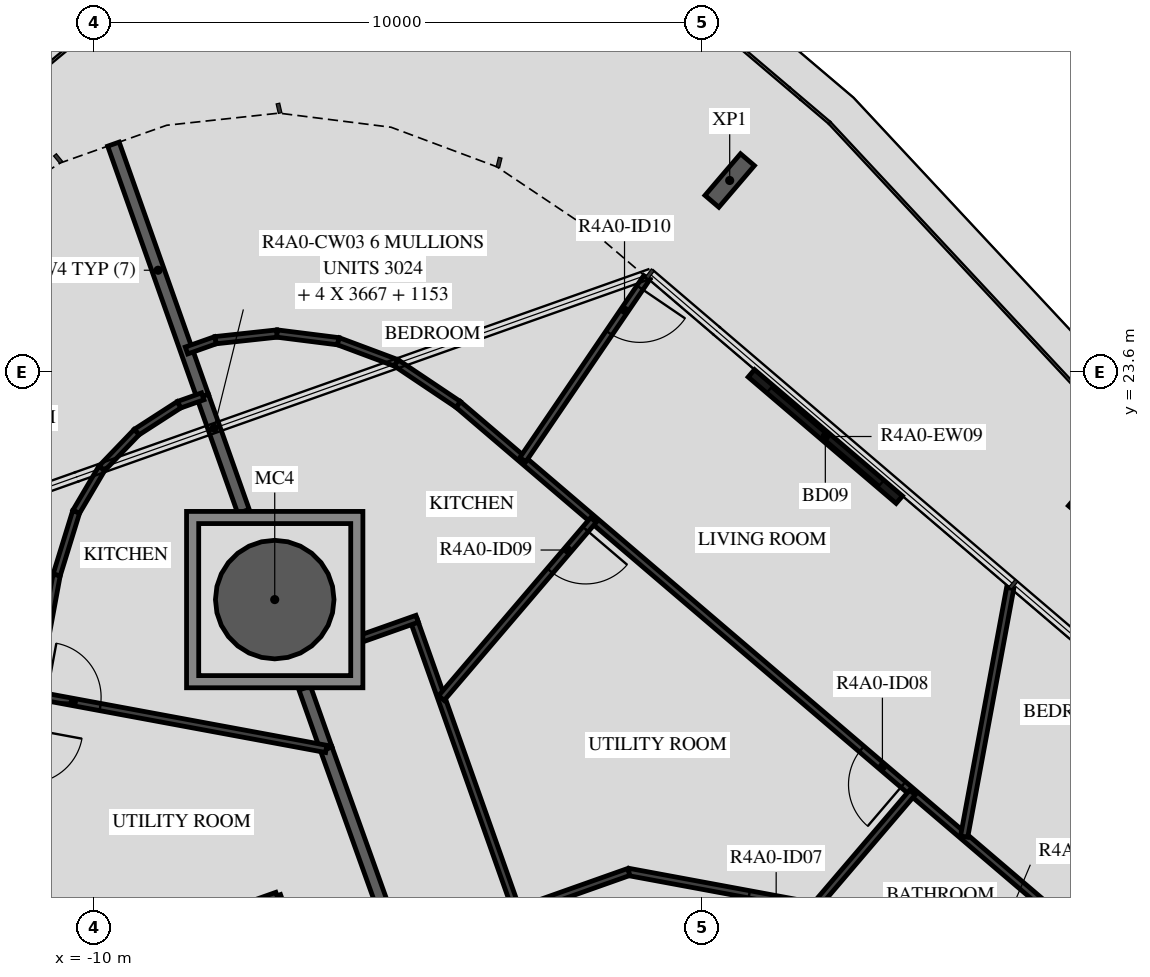
"""IFC4 building model, lengths in metres.
Left out: names, types, materials, properties, quantities, classifications, styles, units other than length and angle.
Written with IfcOpenShell. Run it as: python <this file> out.ifc"""

import sys

from ifc_helpers import new_model, si_unit, direction, frame, frame_2d, origin, origin_2d, place, context, subcontext, project, spatial, polyline, rectangle, hollow_circle, i_section, outline, extrude, element, fill, save


model = new_model("IFC4")
c1 = context("Model", 3, precision=1e-05, world=origin(), true_north=direction((0.0, 1.0)))
c2 = subcontext(c1, "Body", "Model", "MODEL_VIEW")
j1 = project(units=[si_unit("LENGTHUNIT", "METRE"), si_unit("PLANEANGLEUNIT", "RADIAN")], contexts=[c1])
p1 = place(None, origin())
s1 = spatial("IfcSite", under=j1, at=p1, CompositionType="ELEMENT")
p2 = place(p1, origin())
s2 = spatial("IfcBuilding", under=s1, at=p2, CompositionType="ELEMENT")
p3 = place(p2, frame((0.0, 0.0, 151.7)))
s3 = spatial("IfcBuildingStorey", under=s2, at=p3, CompositionType="ELEMENT", Elevation=151.7)
p4 = place(p3, frame((-7.032, 19.858, -0.45), z_axis=(0.0, 0.0, 1.0), x_axis=(1.0, 0.0, 0.0)))
e1 = element("IfcColumn", 1, at=p4, inside=s3, PredefinedType="COLUMN", context=c2, shape_type="SweptSolid", body=[
    extrude(hollow_circle(Radius=0.975, WallThickness=0.045, at=origin_2d()), origin(), (0.0, 0.0, 1.0), 3.57),
])
for number, where, z_axis, x_axis in (
    (2, (6.427, 21.645, -0.45), (0.0, 0.0, 1.0), (0.76, -0.649, 0.0)),
    (3, (0.45, 26.75, -0.45), (0.0, 0.0, 1.0), (0.76, -0.649, 0.0)),
):
    element("IfcColumn", number, at=place(p3, frame(where, z_axis=z_axis, x_axis=x_axis)), inside=s3, PredefinedType="COLUMN", context=c2, shape_type="SweptSolid", body=[
        extrude(i_section(OverallWidth=0.3, OverallDepth=0.9, WebThickness=0.019, FlangeThickness=0.035, FilletRadius=0.03, at=origin_2d()), origin(), (0.0, 0.0, 1.0), 3.57),
    ])
p5 = place(p3, frame((3.24, 21.5, 0.0), z_axis=(0.0, 0.0, 1.0), x_axis=(-0.760429407868, 0.649420599957, 0.0)))
e4 = element("IfcWall", 4, at=p5, inside=s3, PredefinedType="STANDARD", context=c2, shape_type="SweptSolid", body=[
    extrude(rectangle(XDim=3.2, YDim=0.16, at=frame_2d((1.6, 0.0))), origin(), (0.0, 0.0, 1.0), 3.12),
])
p6 = place(p5, frame((0.4, 0.0, 0.0)))
e5 = element("IfcOpeningElement", 5, at=p6, cuts=e4, PredefinedType="OPENING", context=c2, shape_type="SweptSolid", body=[
    extrude(rectangle(XDim=2.4, YDim=2.4, at=frame_2d((1.2, 1.2))), frame((0.0, 0.09, 0.0), z_axis=(0.0, -1.0, 0.0), x_axis=(1.0, 0.0, 0.0)), (0.0, 0.0, 1.0), 0.18),
])
p7 = place(p3, frame((-6.185, 17.402, 0.0), z_axis=(0.0, 0.0, 1.0), x_axis=(0.337736730281, -0.941240618024, 0.0)))
e6 = element("IfcWall", 6, at=p7, inside=s3, PredefinedType="STANDARD", context=c2, shape_type="SweptSolid", body=[
    extrude(rectangle(XDim=5.068, YDim=0.2, at=frame_2d((2.534, 0.0))), origin(), (0.0, 0.0, 1.0), 3.12),
])
p8 = place(p3, frame((-6.539, 18.403, 0.0), z_axis=(0.0, 0.0, 1.0), x_axis=(0.333625806098, -0.942705585804, 0.0)))
e7 = element("IfcWall", 7, at=p8, inside=s3, PredefinedType="STANDARD", context=c2, shape_type="SweptSolid", body=[
    extrude(rectangle(XDim=1.062, YDim=0.2, at=frame_2d((0.531, 0.0))), origin(), (0.0, 0.0, 1.0), 3.12),
])
p9 = place(p3, frame((-9.684, 27.348, 0.0), z_axis=(0.0, 0.0, 1.0), x_axis=(0.333818381408, -0.942637410797, 0.0)))
e8 = element("IfcWall", 8, at=p9, inside=s3, PredefinedType="STANDARD", context=c2, shape_type="SweptSolid", body=[
    extrude(rectangle(XDim=4.4, YDim=0.2, at=frame_2d((2.2, 0.0))), origin(), (0.0, 0.0, 1.0), 3.12),
])
p10 = place(p3, frame((-8.216, 23.2, 0.0), z_axis=(0.0, 0.0, 1.0), x_axis=(0.333793117913, -0.942646357036, 0.0)))
e9 = element("IfcWall", 9, at=p10, inside=s3, PredefinedType="STANDARD", context=c2, shape_type="SweptSolid", body=[
    extrude(rectangle(XDim=2.008, YDim=0.2, at=frame_2d((1.004, 0.0))), origin(), (0.0, 0.0, 1.0), 3.12),
])
p11 = place(p3, frame((8.702, 12.206, 0.0), z_axis=(0.0, 0.0, 1.0), x_axis=(-0.760401313718, 0.649453494945, 0.0)))
e10 = element("IfcWall", 10, at=p11, inside=s3, PredefinedType="PARTITIONING", context=c2, shape_type="SweptSolid", body=[
    extrude(rectangle(XDim=16.724, YDim=0.12, at=frame_2d((8.362, 0.0))), origin(), (0.0, 0.0, 1.0), 3.12),
])
p12 = place(p11, frame((0.2, 0.0, 0.0)))
e11 = element("IfcOpeningElement", 11, at=p12, cuts=e10, PredefinedType="OPENING", context=c2, shape_type="SweptSolid", body=[
    extrude(rectangle(XDim=0.9, YDim=2.1, at=frame_2d((0.45, 1.05))), frame((0.0, 0.07, 0.0), z_axis=(0.0, -1.0, 0.0), x_axis=(1.0, 0.0, 0.0)), (0.0, 0.0, 1.0), 0.14),
])
p13 = place(p11, frame((7.099, 0.0, 0.0)))
e12 = element("IfcOpeningElement", 12, at=p13, cuts=e10, PredefinedType="OPENING", context=c2, shape_type="SweptSolid", body=[
    extrude(rectangle(XDim=0.9, YDim=2.1, at=frame_2d((0.45, 1.05))), frame((0.0, 0.07, 0.0), z_axis=(0.0, -1.0, 0.0), x_axis=(1.0, 0.0, 0.0)), (0.0, 0.0, 1.0), 0.14),
])
p14 = place(p3, frame((6.641, 13.923, 0.0), z_axis=(0.0, 0.0, 1.0), x_axis=(-0.983250157272, 0.182261153912, 0.0)))
e13 = element("IfcWall", 13, at=p14, inside=s3, PredefinedType="PARTITIONING", context=c2, shape_type="SweptSolid", body=[
    extrude(rectangle(XDim=7.985, YDim=0.12, at=frame_2d((3.992, 0.0))), origin(), (0.0, 0.0, 1.0), 3.12),
])
p15 = place(p14, frame((1.4, 0.0, 0.0)))
e14 = element("IfcOpeningElement", 14, at=p15, cuts=e13, PredefinedType="OPENING", context=c2, shape_type="SweptSolid", body=[
    extrude(rectangle(XDim=0.8, YDim=2.1, at=frame_2d((0.4, 1.05))), frame((0.0, 0.07, 0.0), z_axis=(0.0, -1.0, 0.0), x_axis=(1.0, 0.0, 0.0)), (0.0, 0.0, 1.0), 0.14),
])
p16 = place(p14, frame((5.069, 0.0, 0.0)))
e15 = element("IfcOpeningElement", 15, at=p16, cuts=e13, PredefinedType="OPENING", context=c2, shape_type="SweptSolid", body=[
    extrude(rectangle(XDim=0.9, YDim=2.1, at=frame_2d((0.45, 1.05))), frame((0.0, 0.07, 0.0), z_axis=(0.0, -1.0, 0.0), x_axis=(1.0, 0.0, 0.0)), (0.0, 0.0, 1.0), 0.14),
])
p17 = place(p3, frame((-1.21, 15.378, 0.0), z_axis=(0.0, 0.0, 1.0), x_axis=(-0.942633792474, -0.333828598663, 0.0)))
e16 = element("IfcWall", 16, at=p17, inside=s3, PredefinedType="PARTITIONING", context=c2, shape_type="SweptSolid", body=[
    extrude(rectangle(XDim=1.95, YDim=0.12, at=frame_2d((0.975, 0.0))), origin(), (0.0, 0.0, 1.0), 3.12),
])
p18 = place(p3, frame((-3.048, 14.727, 0.0), z_axis=(0.0, 0.0, 1.0), x_axis=(-0.333811603187, 0.942639811157, 0.0)))
e17 = element("IfcWall", 17, at=p18, inside=s3, PredefinedType="PARTITIONING", context=c2, shape_type="SweptSolid", body=[
    extrude(rectangle(XDim=5.087, YDim=0.12, at=frame_2d((2.543, 0.0))), origin(), (0.0, 0.0, 1.0), 3.12),
])
p19 = place(p3, frame((-4.689, 19.542, 0.0), z_axis=(0.0, 0.0, 1.0), x_axis=(-0.942661851862, -0.33374935662, 0.0)))
e18 = element("IfcWall", 18, at=p19, inside=s3, PredefinedType="PARTITIONING", context=c2, shape_type="SweptSolid", body=[
    extrude(rectangle(XDim=1.017, YDim=0.12, at=frame_2d((0.508, 0.0))), origin(), (0.0, 0.0, 1.0), 3.12),
])
p20 = place(p3, frame((5.063, 20.048, 0.0), z_axis=(0.0, 0.0, 1.0), x_axis=(-0.182238575099, -0.983254342348, 0.0)))
e19 = element("IfcWall", 19, at=p20, inside=s3, PredefinedType="PARTITIONING", context=c2, shape_type="SweptSolid", body=[
    extrude(rectangle(XDim=4.157, YDim=0.12, at=frame_2d((2.079, 0.0))), origin(), (0.0, 0.0, 1.0), 3.12),
])
p21 = place(p3, frame((3.456, 16.686, 0.0), z_axis=(0.0, 0.0, 1.0), x_axis=(-0.649462010463, -0.760394040591, 0.0)))
e20 = element("IfcWall", 20, at=p21, inside=s3, PredefinedType="PARTITIONING", context=c2, shape_type="SweptSolid", body=[
    extrude(rectangle(XDim=2.467, YDim=0.12, at=frame_2d((1.233, 0.0))), origin(), (0.0, 0.0, 1.0), 3.12),
])
p22 = place(p3, frame((-0.914, 25.153, 0.0), z_axis=(0.0, 0.0, 1.0), x_axis=(-0.56264004133, -0.826701992191, 0.0)))
e21 = element("IfcWall", 21, at=p22, inside=s3, PredefinedType="PARTITIONING", context=c2, shape_type="SweptSolid", body=[
    extrude(rectangle(XDim=3.622, YDim=0.12, at=frame_2d((1.811, 0.0))), origin(), (0.0, 0.0, 1.0), 2.73),
])
p23 = place(p22, frame((0.2, 0.0, 0.0)))
e22 = element("IfcOpeningElement", 22, at=p23, cuts=e21, PredefinedType="OPENING", context=c2, shape_type="SweptSolid", body=[
    extrude(rectangle(XDim=0.9, YDim=2.1, at=frame_2d((0.45, 1.05))), frame((0.0, 0.07, 0.0), z_axis=(0.0, -1.0, 0.0), x_axis=(1.0, 0.0, 0.0)), (0.0, 0.0, 1.0), 0.14),
])
p24 = place(p3, frame((-1.79, 21.167, 0.0), z_axis=(0.0, 0.0, 1.0), x_axis=(-0.649427819186, -0.760423242456, 0.0)))
e23 = element("IfcWall", 23, at=p24, inside=s3, PredefinedType="PARTITIONING", context=c2, shape_type="SweptSolid", body=[
    extrude(rectangle(XDim=3.851, YDim=0.12, at=frame_2d((1.926, 0.0))), origin(), (0.0, 0.0, 1.0), 3.12),
])
p25 = place(p24, frame((0.2, 0.0, 0.0)))
e24 = element("IfcOpeningElement", 24, at=p25, cuts=e23, PredefinedType="OPENING", context=c2, shape_type="SweptSolid", body=[
    extrude(rectangle(XDim=0.9, YDim=2.1, at=frame_2d((0.45, 1.05))), frame((0.0, 0.07, 0.0), z_axis=(0.0, -1.0, 0.0), x_axis=(1.0, 0.0, 0.0)), (0.0, 0.0, 1.0), 0.14),
])
p26 = place(p3, frame((-8.483, 23.954, 0.0), z_axis=(0.0, 0.0, 1.0), x_axis=(0.942554725445, 0.334051776738, 0.0)))
e25 = element("IfcWall", 25, at=p26, inside=s3, PredefinedType="PARTITIONING", context=c2, shape_type="SweptSolid", body=[
    extrude(rectangle(XDim=0.508, YDim=0.12, at=frame_2d((0.254, 0.0))), origin(), (0.0, 0.0, 1.0), 3.12),
])
p27 = place(p3, frame((-8.004, 24.124, 0.0), z_axis=(0.0, 0.0, 1.0), x_axis=(0.994216064839, 0.107398400431, 0.0)))
e26 = element("IfcWall", 26, at=p27, inside=s3, PredefinedType="PARTITIONING", context=c2, shape_type="SweptSolid", body=[
    extrude(rectangle(XDim=1.016, YDim=0.12, at=frame_2d((0.508, 0.0))), origin(), (0.0, 0.0, 1.0), 3.12),
])
p28 = place(p3, frame((-6.994, 24.233, 0.0), z_axis=(0.0, 0.0, 1.0), x_axis=(0.992188875952, -0.124744676991, 0.0)))
e27 = element("IfcWall", 27, at=p28, inside=s3, PredefinedType="PARTITIONING", context=c2, shape_type="SweptSolid", body=[
    extrude(rectangle(XDim=1.016, YDim=0.12, at=frame_2d((0.508, 0.0))), origin(), (0.0, 0.0, 1.0), 3.12),
])
p29 = place(p3, frame((-5.986, 24.106, 0.0), z_axis=(0.0, 0.0, 1.0), x_axis=(0.936625084254, -0.350333343469, 0.0)))
e28 = element("IfcWall", 28, at=p29, inside=s3, PredefinedType="PARTITIONING", context=c2, shape_type="SweptSolid", body=[
    extrude(rectangle(XDim=1.016, YDim=0.12, at=frame_2d((0.508, 0.0))), origin(), (0.0, 0.0, 1.0), 3.12),
])
p30 = place(p3, frame((-5.034, 23.75, 0.0), z_axis=(0.0, 0.0, 1.0), x_axis=(0.83070096574, -0.556718874764, 0.0)))
e29 = element("IfcWall", 29, at=p30, inside=s3, PredefinedType="PARTITIONING", context=c2, shape_type="SweptSolid", body=[
    extrude(rectangle(XDim=1.227, YDim=0.12, at=frame_2d((0.614, 0.0))), origin(), (0.0, 0.0, 1.0), 3.12),
])
p31 = place(p3, frame((-6.472, 13.515, 0.0), z_axis=(0.0, 0.0, 1.0), x_axis=(-0.333809516424, 0.942640550127, 0.0)))
e30 = element("IfcWall", 30, at=p31, inside=s3, PredefinedType="PARTITIONING", context=c2, shape_type="SweptSolid", body=[
    extrude(rectangle(XDim=1.562, YDim=0.12, at=frame_2d((0.781, 0.0))), origin(), (0.0, 0.0, 1.0), 3.12),
])
p32 = place(p3, frame((-6.993, 14.987, 0.0), z_axis=(0.0, 0.0, 1.0), x_axis=(-0.942599915297, -0.33392424243, 0.0)))
e31 = element("IfcWall", 31, at=p32, inside=s3, PredefinedType="PARTITIONING", context=c2, shape_type="SweptSolid", body=[
    extrude(rectangle(XDim=1.7, YDim=0.12, at=frame_2d((0.85, 0.0))), origin(), (0.0, 0.0, 1.0), 3.12),
])
p33 = place(p3, frame((-8.216, 23.2, 0.0), z_axis=(0.0, 0.0, 1.0), x_axis=(-0.942565413363, -0.33402161836, 0.0)))
e32 = element("IfcWall", 32, at=p33, inside=s3, PredefinedType="PARTITIONING", context=c2, shape_type="SweptSolid", body=[
    extrude(rectangle(XDim=0.414, YDim=0.12, at=frame_2d((0.207, 0.0))), origin(), (0.0, 0.0, 1.0), 3.12),
])
for number, where, z_axis, x_axis in (
    (33, (-8.606, 23.062, 0.0), (0.0, 0.0, 1.0), (-0.84, -0.542, 0.0)),
    (34, (-9.303, 22.612, 0.0), (0.0, 0.0, 1.0), (-0.693, -0.721, 0.0)),
    (35, (-9.877, 22.014, 0.0), (0.0, 0.0, 1.0), (-0.508, -0.861, 0.0)),
):
    element("IfcWall", number, at=place(p3, frame(where, z_axis=z_axis, x_axis=x_axis)), inside=s3, PredefinedType="PARTITIONING", context=c2, shape_type="SweptSolid", body=[
        extrude(rectangle(XDim=0.829, YDim=0.12, at=frame_2d((0.415, 0.0))), origin(), (0.0, 0.0, 1.0), 3.12),
    ])
p34 = place(p3, frame((-10.298, 21.3, 0.0), z_axis=(0.0, 0.0, 1.0), x_axis=(-0.295127342945, -0.955457927617, 0.0)))
e36 = element("IfcWall", 36, at=p34, inside=s3, PredefinedType="PARTITIONING", context=c2, shape_type="SweptSolid", body=[
    extrude(rectangle(XDim=1.087, YDim=0.12, at=frame_2d((0.543, 0.0))), origin(), (0.0, 0.0, 1.0), 3.12),
])
p35 = place(p3, frame((-10.618, 20.262, 0.0), z_axis=(0.0, 0.0, 1.0), x_axis=(-0.182222468274, -0.983257327487, 0.0)))
e37 = element("IfcWall", 37, at=p35, inside=s3, PredefinedType="PARTITIONING", context=c2, shape_type="SweptSolid", body=[
    extrude(rectangle(XDim=12.667, YDim=0.12, at=frame_2d((6.333, 0.0))), origin(), (0.0, 0.0, 1.0), 3.12),
])
p36 = place(p35, frame((2.57, 0.0, 0.0)))
e38 = element("IfcOpeningElement", 38, at=p36, cuts=e37, PredefinedType="OPENING", context=c2, shape_type="SweptSolid", body=[
    extrude(rectangle(XDim=0.9, YDim=2.1, at=frame_2d((0.45, 1.05))), frame((0.0, 0.07, 0.0), z_axis=(0.0, -1.0, 0.0), x_axis=(1.0, 0.0, 0.0)), (0.0, 0.0, 1.0), 0.14),
])
p37 = place(p3, frame((-10.984, 18.291, 0.0), z_axis=(0.0, 0.0, 1.0), x_axis=(0.98324782266, -0.182273748068, 0.0)))
e39 = element("IfcWall", 39, at=p37, inside=s3, PredefinedType="PARTITIONING", context=c2, shape_type="SweptSolid", body=[
    extrude(rectangle(XDim=4.881, YDim=0.12, at=frame_2d((2.44, 0.0))), origin(), (0.0, 0.0, 1.0), 3.12),
])
p38 = place(p37, frame((0.2, 0.0, 0.0)))
e40 = element("IfcOpeningElement", 40, at=p38, cuts=e39, PredefinedType="OPENING", context=c2, shape_type="SweptSolid", body=[
    extrude(rectangle(XDim=0.9, YDim=2.1, at=frame_2d((0.45, 1.05))), frame((0.0, 0.07, 0.0), z_axis=(0.0, -1.0, 0.0), x_axis=(1.0, 0.0, 0.0)), (0.0, 0.0, 1.0), 0.14),
])
p39 = place(p3, origin())
e41 = element("IfcWall", 41, at=p39, inside=s3, PredefinedType="STANDARD", context=c2, shape_type="SweptSolid", body=[
    extrude(outline(polyline([(-5.582, 21.308), (-5.582, 18.408), (-8.482, 18.408), (-8.482, 21.308), (-5.582, 21.308)]), holes=[polyline([(-8.282, 18.608), (-5.782, 18.608), (-5.782, 21.108), (-8.282, 21.108), (-8.282, 18.608)])]), origin(), (0.0, 0.0, 1.0), 3.12),
])
p40 = place(p6, origin())
e42 = element("IfcDoor", 42, at=p40, inside=s3, OperationType="DOUBLE_DOOR_SLIDING", PredefinedType="DOOR", context=c2, shape_type="SweptSolid", body=[
    extrude(rectangle(XDim=2.4, YDim=2.4, at=frame_2d((1.2, 1.2))), frame((0.0, 0.025, 0.0), z_axis=(0.0, -1.0, 0.0), x_axis=(1.0, 0.0, 0.0)), (0.0, 0.0, 1.0), 0.05),
])
fill(e5, e42)
p41 = place(p16, origin())
e43 = element("IfcDoor", 43, at=p41, inside=s3, OperationType="SINGLE_SWING_RIGHT", PredefinedType="DOOR", context=c2, shape_type="SweptSolid", body=[
    extrude(rectangle(XDim=0.9, YDim=2.1, at=frame_2d((0.45, 1.05))), frame((0.0, 0.025, 0.0), z_axis=(0.0, -1.0, 0.0), x_axis=(1.0, 0.0, 0.0)), (0.0, 0.0, 1.0), 0.05),
])
fill(e15, e43)
p42 = place(p13, origin())
e44 = element("IfcDoor", 44, at=p42, inside=s3, OperationType="SINGLE_SWING_RIGHT", PredefinedType="DOOR", context=c2, shape_type="SweptSolid", body=[
    extrude(rectangle(XDim=0.9, YDim=2.1, at=frame_2d((0.45, 1.05))), frame((0.0, 0.025, 0.0), z_axis=(0.0, -1.0, 0.0), x_axis=(1.0, 0.0, 0.0)), (0.0, 0.0, 1.0), 0.05),
])
fill(e12, e44)
p43 = place(p25, origin())
e45 = element("IfcDoor", 45, at=p43, inside=s3, OperationType="SINGLE_SWING_RIGHT", PredefinedType="DOOR", context=c2, shape_type="SweptSolid", body=[
    extrude(rectangle(XDim=0.9, YDim=2.1, at=frame_2d((0.45, 1.05))), frame((0.0, 0.025, 0.0), z_axis=(0.0, -1.0, 0.0), x_axis=(1.0, 0.0, 0.0)), (0.0, 0.0, 1.0), 0.05),
])
fill(e24, e45)
p44 = place(p23, origin())
e46 = element("IfcDoor", 46, at=p44, inside=s3, OperationType="SINGLE_SWING_RIGHT", PredefinedType="DOOR", context=c2, shape_type="SweptSolid", body=[
    extrude(rectangle(XDim=0.9, YDim=2.1, at=frame_2d((0.45, 1.05))), frame((0.0, 0.025, 0.0), z_axis=(0.0, -1.0, 0.0), x_axis=(1.0, 0.0, 0.0)), (0.0, 0.0, 1.0), 0.05),
])
fill(e22, e46)
p45 = place(p38, origin())
e47 = element("IfcDoor", 47, at=p45, inside=s3, OperationType="SINGLE_SWING_LEFT", PredefinedType="DOOR", context=c2, shape_type="SweptSolid", body=[
    extrude(rectangle(XDim=0.9, YDim=2.1, at=frame_2d((0.45, 1.05))), frame((0.0, 0.025, 0.0), z_axis=(0.0, -1.0, 0.0), x_axis=(1.0, 0.0, 0.0)), (0.0, 0.0, 1.0), 0.05),
])
fill(e40, e47)
save(model, sys.argv[1])
